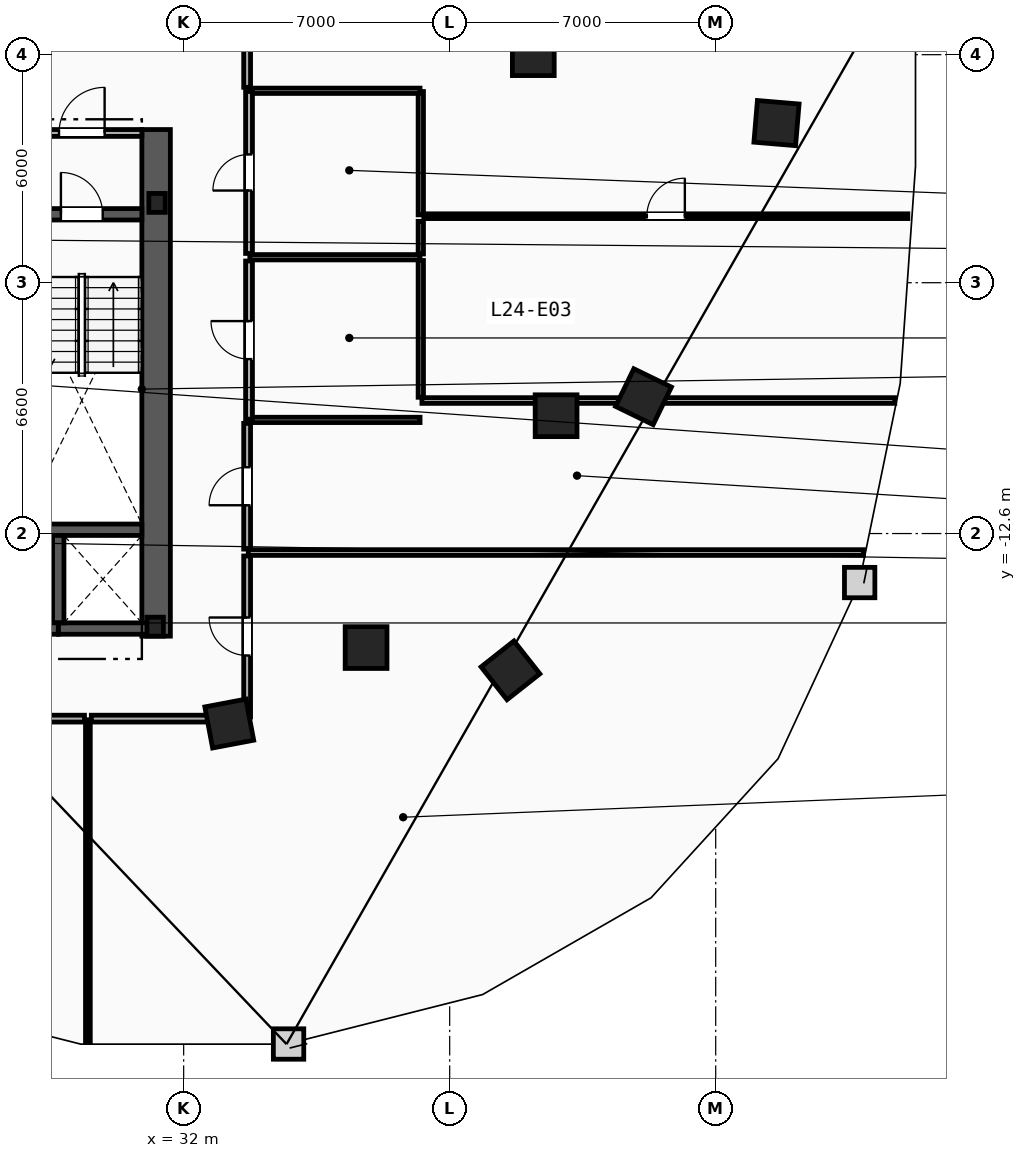
"""IFC4 building model, lengths in metres.
Left out: names, types, materials, properties, quantities, classifications, styles, units other than length and angle.
Written with IfcOpenShell. Run it as: python <this file> out.ifc"""

import sys

from ifc_helpers import new_model, si_unit, direction, frame, frame_2d, origin, origin_2d, place, context, subcontext, project, spatial, rectangle, i_section, extrude, element, fill, save


model = new_model("IFC4")
c1 = context("Model", 3, precision=1e-05, world=origin(), true_north=direction((0.0, 1.0)))
c2 = subcontext(c1, "Body", "Model", "MODEL_VIEW")
j1 = project(units=[si_unit("LENGTHUNIT", "METRE"), si_unit("PLANEANGLEUNIT", "RADIAN")], contexts=[c1])
p1 = place(None, origin())
s1 = spatial("IfcSite", under=j1, at=p1, CompositionType="ELEMENT")
p2 = place(p1, origin())
s2 = spatial("IfcBuilding", under=s1, at=p2, CompositionType="ELEMENT")
p3 = place(p2, frame((0.0, 0.0, 96.2)))
s3 = spatial("IfcBuildingStorey", under=s2, at=p3, CompositionType="ELEMENT", Elevation=96.2)
for number, where, z_axis, x_axis in (
    (1, (31.3, -3.9, 0.0), (0.0, 0.0, 1.0), (1.0, 0.0, 0.0)),
    (2, (31.25, -15.05, 0.0), (0.0, 0.0, 1.0), (1.0, 0.0, 0.0)),
):
    element("IfcColumn", number, at=place(p3, frame(where, z_axis=z_axis, x_axis=x_axis)), inside=s3, PredefinedType="COLUMN", context=c2, shape_type="SweptSolid", body=[
        extrude(i_section(OverallWidth=0.432, OverallDepth=0.498, WebThickness=0.056, FlangeThickness=0.089, FilletRadius=0.018, at=origin_2d()), origin(), (0.0, 0.0, 1.0), 3.6),
    ])
for number, where, z_axis, x_axis in (
    (3, (41.2, 0.0, 0.0), (0.0, 0.0, 1.0), (1.0, 0.0, 0.0)),
    (4, (41.8, -9.5, 0.0), (0.0, 0.0, 1.0), (1.0, 0.0, 0.0)),
    (5, (36.8, -15.6, 0.0), (0.0, 0.0, 1.0), (1.0, 0.0, 0.0)),
    (6, (33.2, -17.6, 0.0), (0.0, 0.0, 1.0), (0.983, 0.186, 0.0)),
    (7, (40.6, -16.2, 0.0), (0.0, 0.0, 1.0), (0.785, 0.619, 0.0)),
    (8, (44.1, -9.0, 0.0), (0.0, 0.0, 1.0), (0.437, 0.899, 0.0)),
    (9, (47.6, -1.8, 0.0), (0.0, 0.0, 1.0), (0.084, 0.997, 0.0)),
):
    element("IfcColumn", number, at=place(p3, frame(where, z_axis=z_axis, x_axis=x_axis)), inside=s3, PredefinedType="COLUMN", context=c2, shape_type="SweptSolid", body=[
        extrude(rectangle(XDim=1.1, YDim=1.1, at=origin_2d()), origin(), (0.0, 0.0, 1.0), 3.6),
    ])
p4 = place(p3, frame((31.275, -15.3, 0.0), z_axis=(0.0, 0.0, 1.0), x_axis=(0.0, 1.0, 0.0)))
e10 = element("IfcWall", 10, at=p4, inside=s3, PredefinedType="SHEAR", context=c2, shape_type="SweptSolid", body=[
    extrude(rectangle(XDim=13.33, YDim=0.75, at=frame_2d((6.665, 0.0))), origin(), (0.0, 0.0, 1.0), 3.3),
])
p5 = place(p3, frame((27.74, -4.2, 0.0), z_axis=(0.0, 0.0, 1.0), x_axis=(1.0, 0.0, 0.0)))
e11 = element("IfcWall", 11, at=p5, inside=s3, PredefinedType="SHEAR", context=c2, shape_type="SweptSolid", body=[
    extrude(rectangle(XDim=3.16, YDim=0.3, at=frame_2d((1.58, 0.0))), origin(), (0.0, 0.0, 1.0), 3.3),
])
p6 = place(p5, frame((1.03, 0.0, 0.0)))
e12 = element("IfcOpeningElement", 12, at=p6, cuts=e11, PredefinedType="OPENING", context=c2, shape_type="SweptSolid", body=[
    extrude(rectangle(XDim=1.1, YDim=2.15, at=frame_2d((0.55, 1.075))), frame((0.0, 0.16, 0.0), z_axis=(0.0, -1.0, 0.0), x_axis=(1.0, 0.0, 0.0)), (0.0, 0.0, 1.0), 0.32),
])
p7 = place(p3, frame((27.74, -12.5, 0.0), z_axis=(0.0, 0.0, 1.0), x_axis=(1.0, 0.0, 0.0)))
e13 = element("IfcWall", 13, at=p7, inside=s3, PredefinedType="SHEAR", context=c2, shape_type="SweptSolid", body=[
    extrude(rectangle(XDim=3.16, YDim=0.3, at=frame_2d((1.58, 0.0))), origin(), (0.0, 0.0, 1.0), 3.3),
])
p8 = place(p3, frame((27.74, -2.06, 0.0), z_axis=(0.0, 0.0, 1.0), x_axis=(1.0, 0.0, 0.0)))
e14 = element("IfcWall", 14, at=p8, inside=s3, PredefinedType="PARTITIONING", context=c2, shape_type="SweptSolid", body=[
    extrude(rectangle(XDim=3.16, YDim=0.18, at=frame_2d((1.58, 0.0))), origin(), (0.0, 0.0, 1.0), 3.3),
])
p9 = place(p8, frame((0.98, 0.0, 0.0)))
e15 = element("IfcOpeningElement", 15, at=p9, cuts=e14, PredefinedType="OPENING", context=c2, shape_type="SweptSolid", body=[
    extrude(rectangle(XDim=1.2, YDim=2.15, at=frame_2d((0.6, 1.075))), frame((0.0, 0.1, 0.0), z_axis=(0.0, -1.0, 0.0), x_axis=(1.0, 0.0, 0.0)), (0.0, 0.0, 1.0), 0.2),
])
p10 = place(p3, frame((28.7, -15.1, 0.0), z_axis=(0.0, 0.0, 1.0), x_axis=(1.0, 0.0, 0.0)))
e16 = element("IfcWall", 16, at=p10, inside=s3, PredefinedType="SHEAR", context=c2, shape_type="SweptSolid", body=[
    extrude(rectangle(XDim=2.5, YDim=0.3, at=frame_2d((1.25, 0.0))), origin(), (0.0, 0.0, 1.0), 3.3),
])
p11 = place(p3, frame((28.7, -14.95, 0.0), z_axis=(0.0, 0.0, 1.0), x_axis=(0.0, 1.0, 0.0)))
e17 = element("IfcWall", 17, at=p11, inside=s3, PredefinedType="SHEAR", context=c2, shape_type="SweptSolid", body=[
    extrude(rectangle(XDim=2.3, YDim=0.3, at=frame_2d((1.15, 0.0))), origin(), (0.0, 0.0, 1.0), 3.3),
])
p12 = place(p3, frame((26.2, -15.1, 0.0), z_axis=(0.0, 0.0, 1.0), x_axis=(1.0, 0.0, 0.0)))
e18 = element("IfcWall", 18, at=p12, inside=s3, PredefinedType="SHEAR", context=c2, shape_type="SweptSolid", body=[
    extrude(rectangle(XDim=2.5, YDim=0.3, at=frame_2d((1.25, 0.0))), origin(), (0.0, 0.0, 1.0), 3.3),
])
p13 = place(p3, frame((38.24, -9.015, 0.0), z_axis=(0.0, 0.0, 1.0), x_axis=(0.0, 1.0, 0.0)))
e19 = element("IfcWall", 19, at=p13, inside=s3, PredefinedType="PARTITIONING", context=c2, shape_type="SweptSolid", body=[
    extrude(rectangle(XDim=3.6, YDim=0.14, at=frame_2d((1.8, 0.0))), origin(), (0.0, 0.0, 1.0), 3.3),
])
p14 = place(p3, frame((38.24, -5.245, 0.0), z_axis=(0.0, 0.0, 1.0), x_axis=(0.0, 1.0, 0.0)))
e20 = element("IfcWall", 20, at=p14, inside=s3, PredefinedType="PARTITIONING", context=c2, shape_type="SweptSolid", body=[
    extrude(rectangle(XDim=0.86, YDim=0.14, at=frame_2d((0.43, 0.0))), origin(), (0.0, 0.0, 1.0), 3.3),
])
p15 = place(p3, frame((38.24, -4.215, 0.0), z_axis=(0.0, 0.0, 1.0), x_axis=(0.0, 1.0, 0.0)))
e21 = element("IfcWall", 21, at=p15, inside=s3, PredefinedType="PARTITIONING", context=c2, shape_type="SweptSolid", body=[
    extrude(rectangle(XDim=3.245, YDim=0.14, at=frame_2d((1.623, 0.0))), origin(), (0.0, 0.0, 1.0), 3.3),
])
for number, where, z_axis, x_axis in (
    (22, (33.74, -0.95, 0.0), (0.0, 0.0, 1.0), (1.0, 0.0, 0.0)),
    (23, (33.74, -5.33, 0.0), (0.0, 0.0, 1.0), (1.0, 0.0, 0.0)),
    (24, (33.74, -9.61, 0.0), (0.0, 0.0, 1.0), (1.0, 0.0, 0.0)),
):
    element("IfcWall", number, at=place(p3, frame(where, z_axis=z_axis, x_axis=x_axis)), inside=s3, PredefinedType="PARTITIONING", context=c2, shape_type="SweptSolid", body=[
        extrude(rectangle(XDim=4.48, YDim=0.14, at=frame_2d((2.24, 0.0))), origin(), (0.0, 0.0, 1.0), 3.3),
    ])
p16 = place(p3, frame((33.72, -5.23, 0.0), z_axis=(0.0, 0.0, 1.0), x_axis=(0.0, 1.0, 0.0)))
e25 = element("IfcWall", 25, at=p16, inside=s3, PredefinedType="PARTITIONING", context=c2, shape_type="SweptSolid", body=[
    extrude(rectangle(XDim=4.26, YDim=0.18, at=frame_2d((2.13, 0.0))), origin(), (0.0, 0.0, 1.0), 3.3),
])
p17 = place(p16, frame((1.655, 0.0, 0.0)))
e26 = element("IfcOpeningElement", 26, at=p17, cuts=e25, PredefinedType="OPENING", context=c2, shape_type="SweptSolid", body=[
    extrude(rectangle(XDim=0.95, YDim=2.1, at=frame_2d((0.475, 1.05))), frame((0.0, 0.1, 0.0), z_axis=(0.0, -1.0, 0.0), x_axis=(1.0, 0.0, 0.0)), (0.0, 0.0, 1.0), 0.2),
])
p18 = place(p3, frame((33.72, -9.59, 0.0), z_axis=(0.0, 0.0, 1.0), x_axis=(0.0, 1.0, 0.0)))
e27 = element("IfcWall", 27, at=p18, inside=s3, PredefinedType="PARTITIONING", context=c2, shape_type="SweptSolid", body=[
    extrude(rectangle(XDim=4.16, YDim=0.18, at=frame_2d((2.08, 0.0))), origin(), (0.0, 0.0, 1.0), 3.3),
])
p19 = place(p18, frame((1.58, 0.0, 0.0)))
e28 = element("IfcOpeningElement", 28, at=p19, cuts=e27, PredefinedType="OPENING", context=c2, shape_type="SweptSolid", body=[
    extrude(rectangle(XDim=1.0, YDim=2.15, at=frame_2d((0.5, 1.075))), frame((0.0, 0.1, 0.0), z_axis=(0.0, -1.0, 0.0), x_axis=(1.0, 0.0, 0.0)), (0.0, 0.0, 1.0), 0.2),
])
p20 = place(p3, frame((38.27, -9.1, 0.0), z_axis=(0.0, 0.0, 1.0), x_axis=(1.0, 0.0, 0.0)))
e29 = element("IfcWall", 29, at=p20, inside=s3, PredefinedType="PARTITIONING", context=c2, shape_type="SweptSolid", body=[
    extrude(rectangle(XDim=12.442, YDim=0.15, at=frame_2d((6.221, 0.0))), origin(), (0.0, 0.0, 1.0), 3.3),
])
p21 = place(p3, frame((33.7, -13.1, 0.0), z_axis=(0.0, 0.0, 1.0), x_axis=(1.0, 0.0, 0.0)))
e30 = element("IfcWall", 30, at=p21, inside=s3, PredefinedType="PARTITIONING", context=c2, shape_type="SweptSolid", body=[
    extrude(rectangle(XDim=16.19, YDim=0.15, at=frame_2d((8.095, 0.0))), origin(), (0.0, 0.0, 1.0), 3.3),
])
p22 = place(p3, frame((29.48, -25.985, 0.0), z_axis=(0.0, 0.0, 1.0), x_axis=(0.0, 1.0, 0.0)))
e31 = element("IfcWall", 31, at=p22, inside=s3, PredefinedType="PARTITIONING", context=c2, shape_type="SweptSolid", body=[
    extrude(rectangle(XDim=8.485, YDim=0.125, at=frame_2d((4.243, 0.0))), origin(), (0.0, 0.0, 1.0), 3.3),
])
p23 = place(p3, frame((33.67, -17.428, 0.0), z_axis=(0.0, 0.0, 1.0), x_axis=(0.0, 1.0, 0.0)))
e32 = element("IfcWall", 32, at=p23, inside=s3, PredefinedType="PARTITIONING", context=c2, shape_type="SweptSolid", body=[
    extrude(rectangle(XDim=4.239, YDim=0.18, at=frame_2d((2.119, 0.0))), origin(), (0.0, 0.0, 1.0), 3.3),
])
p24 = place(p23, frame((1.619, 0.0, 0.0)))
e33 = element("IfcOpeningElement", 33, at=p24, cuts=e32, PredefinedType="OPENING", context=c2, shape_type="SweptSolid", body=[
    extrude(rectangle(XDim=1.0, YDim=2.15, at=frame_2d((0.5, 1.075))), frame((0.0, 0.1, 0.0), z_axis=(0.0, -1.0, 0.0), x_axis=(1.0, 0.0, 0.0)), (0.0, 0.0, 1.0), 0.2),
])
p25 = place(p3, frame((29.57, -17.47, 0.0), z_axis=(0.0, 0.0, 1.0), x_axis=(1.0, 0.0, 0.0)))
e34 = element("IfcWall", 34, at=p25, inside=s3, PredefinedType="PARTITIONING", context=c2, shape_type="SweptSolid", body=[
    extrude(rectangle(XDim=4.058, YDim=0.18, at=frame_2d((2.029, 0.0))), origin(), (0.0, 0.0, 1.0), 3.3),
])
p26 = place(p3, frame((33.67, -13.01, 0.0), z_axis=(0.0, 0.0, 1.0), x_axis=(0.0, 1.0, 0.0)))
e35 = element("IfcWall", 35, at=p26, inside=s3, PredefinedType="PARTITIONING", context=c2, shape_type="SweptSolid", body=[
    extrude(rectangle(XDim=3.309, YDim=0.18, at=frame_2d((1.654, 0.0))), origin(), (0.0, 0.0, 1.0), 3.3),
])
p27 = place(p26, frame((1.154, 0.0, 0.0)))
e36 = element("IfcOpeningElement", 36, at=p27, cuts=e35, PredefinedType="OPENING", context=c2, shape_type="SweptSolid", body=[
    extrude(rectangle(XDim=1.0, YDim=2.15, at=frame_2d((0.5, 1.075))), frame((0.0, 0.1, 0.0), z_axis=(0.0, -1.0, 0.0), x_axis=(1.0, 0.0, 0.0)), (0.0, 0.0, 1.0), 0.2),
])
p28 = place(p3, frame((16.822, -17.47, 0.0), z_axis=(0.0, 0.0, 1.0), x_axis=(1.0, 0.0, 0.0)))
e37 = element("IfcWall", 37, at=p28, inside=s3, PredefinedType="PARTITIONING", context=c2, shape_type="SweptSolid", body=[
    extrude(rectangle(XDim=12.568, YDim=0.18, at=frame_2d((6.284, 0.0))), origin(), (0.0, 0.0, 1.0), 3.3),
])
p29 = place(p3, frame((33.67, -0.859, 0.0), z_axis=(0.0, 0.0, 1.0), x_axis=(0.0, 1.0, 0.0)))
e38 = element("IfcWall", 38, at=p29, inside=s3, PredefinedType="PARTITIONING", context=c2, shape_type="SweptSolid", body=[
    extrude(rectangle(XDim=10.389, YDim=0.18, at=frame_2d((5.194, 0.0))), origin(), (0.0, 0.0, 1.0), 3.3),
])
p30 = place(p29, frame((4.694, 0.0, 0.0)))
e39 = element("IfcOpeningElement", 39, at=p30, cuts=e38, PredefinedType="OPENING", context=c2, shape_type="SweptSolid", body=[
    extrude(rectangle(XDim=1.0, YDim=2.15, at=frame_2d((0.5, 1.075))), frame((0.0, 0.1, 0.0), z_axis=(0.0, -1.0, 0.0), x_axis=(1.0, 0.0, 0.0)), (0.0, 0.0, 1.0), 0.2),
])
p31 = place(p3, frame((38.32, -4.25, 0.0), z_axis=(0.0, 0.0, 1.0), x_axis=(1.0, 0.0, 0.0)))
e40 = element("IfcWall", 40, at=p31, inside=s3, PredefinedType="PARTITIONING", context=c2, shape_type="SweptSolid", body=[
    extrude(rectangle(XDim=12.737, YDim=0.125, at=frame_2d((6.368, 0.0))), origin(), (0.0, 0.0, 1.0), 3.3),
])
p32 = place(p31, frame((5.868, 0.0, 0.0)))
e41 = element("IfcOpeningElement", 41, at=p32, cuts=e40, PredefinedType="OPENING", context=c2, shape_type="SweptSolid", body=[
    extrude(rectangle(XDim=1.0, YDim=2.15, at=frame_2d((0.5, 1.075))), frame((0.0, 0.073, 0.0), z_axis=(0.0, -1.0, 0.0), x_axis=(1.0, 0.0, 0.0)), (0.0, 0.0, 1.0), 0.145),
])
p33 = place(p6, origin())
e42 = element("IfcDoor", 42, at=p33, inside=s3, OperationType="SINGLE_SWING_LEFT", PredefinedType="DOOR", context=c2, shape_type="SweptSolid", body=[
    extrude(rectangle(XDim=1.1, YDim=2.15, at=frame_2d((0.55, 1.075))), frame((0.0, 0.025, 0.0), z_axis=(0.0, -1.0, 0.0), x_axis=(1.0, 0.0, 0.0)), (0.0, 0.0, 1.0), 0.05),
])
fill(e12, e42)
p34 = place(p9, origin())
e43 = element("IfcDoor", 43, at=p34, inside=s3, OperationType="SINGLE_SWING_RIGHT", PredefinedType="DOOR", context=c2, shape_type="SweptSolid", body=[
    extrude(rectangle(XDim=1.2, YDim=2.15, at=frame_2d((0.6, 1.075))), frame((0.0, 0.025, 0.0), z_axis=(0.0, -1.0, 0.0), x_axis=(1.0, 0.0, 0.0)), (0.0, 0.0, 1.0), 0.05),
])
fill(e15, e43)
p35 = place(p32, origin())
e44 = element("IfcDoor", 44, at=p35, inside=s3, OperationType="SINGLE_SWING_RIGHT", PredefinedType="DOOR", context=c2, shape_type="SweptSolid", body=[
    extrude(rectangle(XDim=1.0, YDim=2.15, at=frame_2d((0.5, 1.075))), frame((0.0, 0.025, 0.0), z_axis=(0.0, -1.0, 0.0), x_axis=(1.0, 0.0, 0.0)), (0.0, 0.0, 1.0), 0.05),
])
fill(e41, e44)
p36 = place(p17, origin())
e45 = element("IfcDoor", 45, at=p36, inside=s3, OperationType="SINGLE_SWING_LEFT", PredefinedType="DOOR", context=c2, shape_type="SweptSolid", body=[
    extrude(rectangle(XDim=0.95, YDim=2.1, at=frame_2d((0.475, 1.05))), frame((0.0, 0.025, 0.0), z_axis=(0.0, -1.0, 0.0), x_axis=(1.0, 0.0, 0.0)), (0.0, 0.0, 1.0), 0.05),
])
fill(e26, e45)
p37 = place(p24, origin())
e46 = element("IfcDoor", 46, at=p37, inside=s3, OperationType="SINGLE_SWING_RIGHT", PredefinedType="DOOR", context=c2, shape_type="SweptSolid", body=[
    extrude(rectangle(XDim=1.0, YDim=2.15, at=frame_2d((0.5, 1.075))), frame((0.0, 0.025, 0.0), z_axis=(0.0, -1.0, 0.0), x_axis=(1.0, 0.0, 0.0)), (0.0, 0.0, 1.0), 0.05),
])
fill(e33, e46)
p38 = place(p19, origin())
e47 = element("IfcDoor", 47, at=p38, inside=s3, OperationType="SINGLE_SWING_RIGHT", PredefinedType="DOOR", context=c2, shape_type="SweptSolid", body=[
    extrude(rectangle(XDim=1.0, YDim=2.15, at=frame_2d((0.5, 1.075))), frame((0.0, 0.025, 0.0), z_axis=(0.0, -1.0, 0.0), x_axis=(1.0, 0.0, 0.0)), (0.0, 0.0, 1.0), 0.05),
])
fill(e28, e47)
p39 = place(p27, origin())
e48 = element("IfcDoor", 48, at=p39, inside=s3, OperationType="SINGLE_SWING_LEFT", PredefinedType="DOOR", context=c2, shape_type="SweptSolid", body=[
    extrude(rectangle(XDim=1.0, YDim=2.15, at=frame_2d((0.5, 1.075))), frame((0.0, 0.025, 0.0), z_axis=(0.0, -1.0, 0.0), x_axis=(1.0, 0.0, 0.0)), (0.0, 0.0, 1.0), 0.05),
])
fill(e36, e48)
save(model, sys.argv[1])
